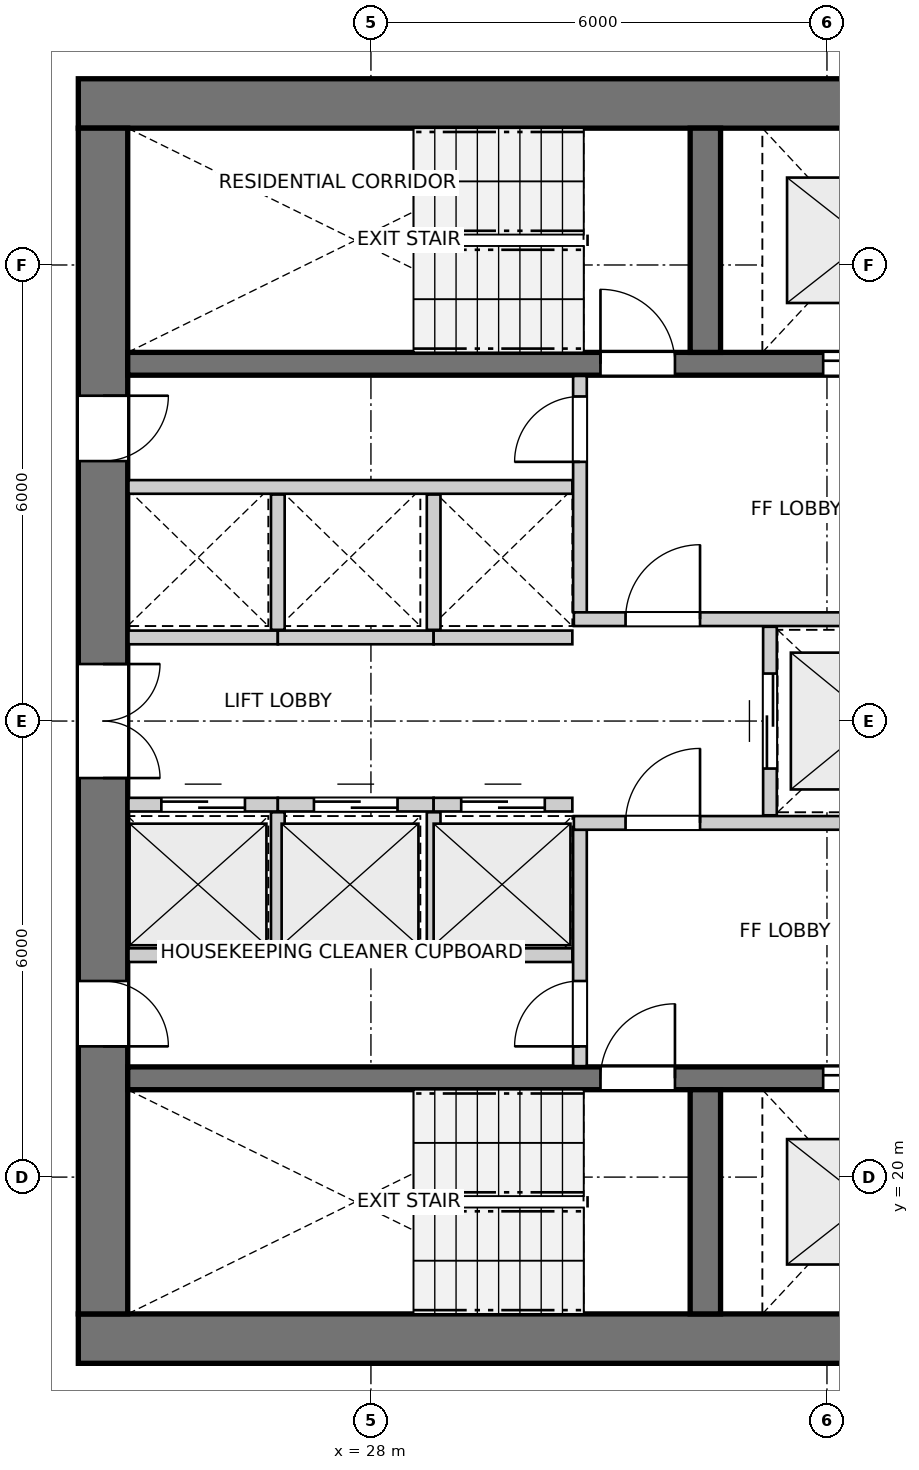
"""IFC4 building model, lengths in metres.
Left out: names, types, materials, properties, quantities, classifications, styles, units other than length and angle.
Written with IfcOpenShell. Run it as: python <this file> out.ifc"""

import sys

from ifc_helpers import new_model, si_unit, direction, frame, frame_2d, origin, place, context, subcontext, project, spatial, rectangle, extrude, source, transform, mapped, element, fill, save


model = new_model("IFC4")
c1 = context("Model", 3, precision=1e-05, world=origin(), true_north=direction((0.0, 1.0)))
c2 = subcontext(c1, "Body", "Model", "MODEL_VIEW")
j1 = project(units=[si_unit("LENGTHUNIT", "METRE"), si_unit("PLANEANGLEUNIT", "RADIAN")], contexts=[c1])
p1 = place(None, origin())
s1 = spatial("IfcSite", under=j1, at=p1, CompositionType="ELEMENT")
p2 = place(p1, origin())
s2 = spatial("IfcBuilding", under=s1, at=p2, CompositionType="ELEMENT")
p3 = place(p2, frame((0.0, 0.0, 102.4)))
s3 = spatial("IfcBuildingStorey", under=s2, at=p3, CompositionType="ELEMENT", Elevation=102.4)
for number, where, z_axis, x_axis in (
    (1, (24.15, 17.875, 0.0), (0.0, 0.0, 1.0), (1.0, 0.0, 0.0)),
    (2, (36.55, 34.125, 0.0), (0.0, 0.0, 1.0), (-1.0, 0.0, 0.0)),
):
    element("IfcWall", number, at=place(p3, frame(where, z_axis=z_axis, x_axis=x_axis)), inside=s3, PredefinedType="SHEAR", context=c2, shape_type="SweptSolid", body=[
        extrude(rectangle(XDim=12.4, YDim=0.65, at=frame_2d((6.2, 0.0))), origin(), (0.0, 0.0, 1.0), 2.95),
    ])
p4 = place(p3, frame((24.475, 33.8, 0.0), z_axis=(0.0, 0.0, 1.0), x_axis=(0.0, -1.0, 0.0)))
e3 = element("IfcWall", 3, at=p4, inside=s3, PredefinedType="SHEAR", context=c2, shape_type="SweptSolid", body=[
    extrude(rectangle(XDim=15.6, YDim=0.65, at=frame_2d((7.8, 0.0))), origin(), (0.0, 0.0, 1.0), 2.95),
])
p5 = place(p4, frame((7.05, 0.0, 0.0)))
e4 = element("IfcOpeningElement", 4, at=p5, cuts=e3, PredefinedType="OPENING", context=c2, shape_type="SweptSolid", body=[
    extrude(rectangle(XDim=1.5, YDim=2.15, at=frame_2d((0.75, 1.075))), frame((0.0, 0.335, 0.0), z_axis=(0.0, -1.0, 0.0), x_axis=(1.0, 0.0, 0.0)), (0.0, 0.0, 1.0), 0.67),
])
p6 = place(p4, frame((3.52, 0.0, 0.0)))
e5 = element("IfcOpeningElement", 5, at=p6, cuts=e3, PredefinedType="OPENING", context=c2, shape_type="SweptSolid", body=[
    extrude(rectangle(XDim=0.86, YDim=2.05, at=frame_2d((0.43, 1.025))), frame((0.0, 0.335, 0.0), z_axis=(0.0, -1.0, 0.0), x_axis=(1.0, 0.0, 0.0)), (0.0, 0.0, 1.0), 0.67),
])
p7 = place(p4, frame((11.22, 0.0, 0.0)))
e6 = element("IfcOpeningElement", 6, at=p7, cuts=e3, PredefinedType="OPENING", context=c2, shape_type="SweptSolid", body=[
    extrude(rectangle(XDim=0.86, YDim=2.05, at=frame_2d((0.43, 1.025))), frame((0.0, 0.335, 0.0), z_axis=(0.0, -1.0, 0.0), x_axis=(1.0, 0.0, 0.0)), (0.0, 0.0, 1.0), 0.67),
])
p8 = place(p3, frame((24.8, 21.3, 0.0), z_axis=(0.0, 0.0, 1.0), x_axis=(1.0, 0.0, 0.0)))
e7 = element("IfcWall", 7, at=p8, inside=s3, PredefinedType="SHEAR", context=c2, shape_type="SweptSolid", body=[
    extrude(rectangle(XDim=11.1, YDim=0.3, at=frame_2d((5.55, 0.0))), origin(), (0.0, 0.0, 1.0), 2.95),
])
p9 = place(p8, frame((6.22, 0.0, 0.0)))
e8 = element("IfcOpeningElement", 8, at=p9, cuts=e7, PredefinedType="OPENING", context=c2, shape_type="SweptSolid", body=[
    extrude(rectangle(XDim=0.98, YDim=2.15, at=frame_2d((0.49, 1.075))), frame((0.0, 0.16, 0.0), z_axis=(0.0, -1.0, 0.0), x_axis=(1.0, 0.0, 0.0)), (0.0, 0.0, 1.0), 0.32),
])
p10 = place(p8, frame((9.15, 0.0, 0.0)))
e9 = element("IfcOpeningElement", 9, at=p10, cuts=e7, PredefinedType="OPENING", context=c2, shape_type="SweptSolid", body=[
    extrude(rectangle(XDim=1.15, YDim=2.15, at=frame_2d((0.575, 1.075))), frame((0.0, 0.16, 0.0), z_axis=(0.0, -1.0, 0.0), x_axis=(1.0, 0.0, 0.0)), (0.0, 0.0, 1.0), 0.32),
])
p11 = place(p3, frame((32.4, 18.2, 0.0), z_axis=(0.0, 0.0, 1.0), x_axis=(0.0, 1.0, 0.0)))
e10 = element("IfcWall", 10, at=p11, inside=s3, PredefinedType="SHEAR", context=c2, shape_type="SweptSolid", body=[
    extrude(rectangle(XDim=2.95, YDim=0.4, at=frame_2d((1.475, 0.0))), origin(), (0.0, 0.0, 1.0), 2.95),
])
p12 = place(p3, frame((24.8, 30.7, 0.0), z_axis=(0.0, 0.0, 1.0), x_axis=(1.0, 0.0, 0.0)))
e11 = element("IfcWall", 11, at=p12, inside=s3, PredefinedType="SHEAR", context=c2, shape_type="SweptSolid", body=[
    extrude(rectangle(XDim=11.1, YDim=0.3, at=frame_2d((5.55, 0.0))), origin(), (0.0, 0.0, 1.0), 2.95),
])
p13 = place(p12, frame((6.22, 0.0, 0.0)))
e12 = element("IfcOpeningElement", 12, at=p13, cuts=e11, PredefinedType="OPENING", context=c2, shape_type="SweptSolid", body=[
    extrude(rectangle(XDim=0.98, YDim=2.15, at=frame_2d((0.49, 1.075))), frame((0.0, 0.16, 0.0), z_axis=(0.0, -1.0, 0.0), x_axis=(1.0, 0.0, 0.0)), (0.0, 0.0, 1.0), 0.32),
])
p14 = place(p12, frame((9.15, 0.0, 0.0)))
e13 = element("IfcOpeningElement", 13, at=p14, cuts=e11, PredefinedType="OPENING", context=c2, shape_type="SweptSolid", body=[
    extrude(rectangle(XDim=1.15, YDim=2.15, at=frame_2d((0.575, 1.075))), frame((0.0, 0.16, 0.0), z_axis=(0.0, -1.0, 0.0), x_axis=(1.0, 0.0, 0.0)), (0.0, 0.0, 1.0), 0.32),
])
p15 = place(p3, frame((32.4, 30.85, 0.0), z_axis=(0.0, 0.0, 1.0), x_axis=(0.0, 1.0, 0.0)))
e14 = element("IfcWall", 14, at=p15, inside=s3, PredefinedType="SHEAR", context=c2, shape_type="SweptSolid", body=[
    extrude(rectangle(XDim=2.95, YDim=0.4, at=frame_2d((1.475, 0.0))), origin(), (0.0, 0.0, 1.0), 2.95),
])
p16 = place(p3, frame((30.75, 21.46, 0.0), z_axis=(0.0, 0.0, 1.0), x_axis=(0.0, 1.0, 0.0)))
e15 = element("IfcWall", 15, at=p16, inside=s3, PredefinedType="PARTITIONING", context=c2, shape_type="SweptSolid", body=[
    extrude(rectangle(XDim=3.11, YDim=0.18, at=frame_2d((1.555, 0.0))), origin(), (0.0, 0.0, 1.0), 2.95),
])
p17 = place(p16, frame((0.26, 0.0, 0.0)))
e16 = element("IfcOpeningElement", 16, at=p17, cuts=e15, PredefinedType="OPENING", context=c2, shape_type="SweptSolid", body=[
    extrude(rectangle(XDim=0.86, YDim=2.05, at=frame_2d((0.43, 1.025))), frame((0.0, 0.1, 0.0), z_axis=(0.0, -1.0, 0.0), x_axis=(1.0, 0.0, 0.0)), (0.0, 0.0, 1.0), 0.2),
])
p18 = place(p3, frame((30.67, 24.66, 0.0), z_axis=(0.0, 0.0, 1.0), x_axis=(1.0, 0.0, 0.0)))
e17 = element("IfcWall", 17, at=p18, inside=s3, PredefinedType="PARTITIONING", context=c2, shape_type="SweptSolid", body=[
    extrude(rectangle(XDim=5.22, YDim=0.18, at=frame_2d((2.61, 0.0))), origin(), (0.0, 0.0, 1.0), 2.95),
])
p19 = place(p18, frame((0.68, 0.0, 0.0)))
e18 = element("IfcOpeningElement", 18, at=p19, cuts=e17, PredefinedType="OPENING", context=c2, shape_type="SweptSolid", body=[
    extrude(rectangle(XDim=0.98, YDim=2.15, at=frame_2d((0.49, 1.075))), frame((0.0, 0.1, 0.0), z_axis=(0.0, -1.0, 0.0), x_axis=(1.0, 0.0, 0.0)), (0.0, 0.0, 1.0), 0.2),
])
p20 = place(p3, frame((30.75, 27.43, 0.0), z_axis=(0.0, 0.0, 1.0), x_axis=(0.0, 1.0, 0.0)))
e19 = element("IfcWall", 19, at=p20, inside=s3, PredefinedType="PARTITIONING", context=c2, shape_type="SweptSolid", body=[
    extrude(rectangle(XDim=3.11, YDim=0.18, at=frame_2d((1.555, 0.0))), origin(), (0.0, 0.0, 1.0), 2.95),
])
p21 = place(p20, frame((1.98, 0.0, 0.0)))
e20 = element("IfcOpeningElement", 20, at=p21, cuts=e19, PredefinedType="OPENING", context=c2, shape_type="SweptSolid", body=[
    extrude(rectangle(XDim=0.86, YDim=2.05, at=frame_2d((0.43, 1.025))), frame((0.0, 0.1, 0.0), z_axis=(0.0, -1.0, 0.0), x_axis=(1.0, 0.0, 0.0)), (0.0, 0.0, 1.0), 0.2),
])
p22 = place(p3, frame((30.67, 27.34, 0.0), z_axis=(0.0, 0.0, 1.0), x_axis=(1.0, 0.0, 0.0)))
e21 = element("IfcWall", 21, at=p22, inside=s3, PredefinedType="PARTITIONING", context=c2, shape_type="SweptSolid", body=[
    extrude(rectangle(XDim=5.22, YDim=0.18, at=frame_2d((2.61, 0.0))), origin(), (0.0, 0.0, 1.0), 2.95),
])
p23 = place(p22, frame((0.68, 0.0, 0.0)))
e22 = element("IfcOpeningElement", 22, at=p23, cuts=e21, PredefinedType="OPENING", context=c2, shape_type="SweptSolid", body=[
    extrude(rectangle(XDim=0.98, YDim=2.15, at=frame_2d((0.49, 1.075))), frame((0.0, 0.1, 0.0), z_axis=(0.0, -1.0, 0.0), x_axis=(1.0, 0.0, 0.0)), (0.0, 0.0, 1.0), 0.2),
])
p24 = place(p3, frame((33.25, 24.76, 0.0), z_axis=(0.0, 0.0, 1.0), x_axis=(0.0, 1.0, 0.0)))
e23 = element("IfcWall", 23, at=p24, inside=s3, PredefinedType="PARTITIONING", context=c2, shape_type="SweptSolid", body=[
    extrude(rectangle(XDim=2.48, YDim=0.18, at=frame_2d((1.24, 0.0))), origin(), (0.0, 0.0, 1.0), 2.95),
])
p25 = place(p24, frame((0.615, 0.0, 0.0)))
e24 = element("IfcOpeningElement", 24, at=p25, cuts=e23, PredefinedType="OPENING", context=c2, shape_type="SweptSolid", body=[
    extrude(rectangle(XDim=1.25, YDim=2.15, at=frame_2d((0.625, 1.075))), frame((0.0, 0.1, 0.0), z_axis=(0.0, -1.0, 0.0), x_axis=(1.0, 0.0, 0.0)), (0.0, 0.0, 1.0), 0.2),
])
p26 = place(p3, frame((24.81, 22.92, 0.0), z_axis=(0.0, 0.0, 1.0), x_axis=(1.0, 0.0, 0.0)))
e25 = element("IfcWall", 25, at=p26, inside=s3, PredefinedType="PARTITIONING", context=c2, shape_type="SweptSolid", body=[
    extrude(rectangle(XDim=5.84, YDim=0.18, at=frame_2d((2.92, 0.0))), origin(), (0.0, 0.0, 1.0), 2.95),
])
p27 = place(p3, frame((24.81, 24.9, 0.0), z_axis=(0.0, 0.0, 1.0), x_axis=(1.0, 0.0, 0.0)))
e26 = element("IfcWall", 26, at=p27, inside=s3, PredefinedType="PARTITIONING", context=c2, shape_type="SweptSolid", body=[
    extrude(rectangle(XDim=1.965, YDim=0.18, at=frame_2d((0.982, 0.0))), origin(), (0.0, 0.0, 1.0), 2.95),
])
p28 = place(p27, frame((0.433, 0.0, 0.0)))
e27 = element("IfcOpeningElement", 27, at=p28, cuts=e26, PredefinedType="OPENING", context=c2, shape_type="SweptSolid", body=[
    extrude(rectangle(XDim=1.1, YDim=2.15, at=frame_2d((0.55, 1.075))), frame((0.0, 0.1, 0.0), z_axis=(0.0, -1.0, 0.0), x_axis=(1.0, 0.0, 0.0)), (0.0, 0.0, 1.0), 0.2),
])
p29 = place(p3, frame((26.775, 24.9, 0.0), z_axis=(0.0, 0.0, 1.0), x_axis=(1.0, 0.0, 0.0)))
e28 = element("IfcWall", 28, at=p29, inside=s3, PredefinedType="PARTITIONING", context=c2, shape_type="SweptSolid", body=[
    extrude(rectangle(XDim=2.05, YDim=0.18, at=frame_2d((1.025, 0.0))), origin(), (0.0, 0.0, 1.0), 2.95),
])
p30 = place(p29, frame((0.475, 0.0, 0.0)))
e29 = element("IfcOpeningElement", 29, at=p30, cuts=e28, PredefinedType="OPENING", context=c2, shape_type="SweptSolid", body=[
    extrude(rectangle(XDim=1.1, YDim=2.15, at=frame_2d((0.55, 1.075))), frame((0.0, 0.1, 0.0), z_axis=(0.0, -1.0, 0.0), x_axis=(1.0, 0.0, 0.0)), (0.0, 0.0, 1.0), 0.2),
])
p31 = place(p3, frame((26.775, 23.02, 0.0), z_axis=(0.0, 0.0, 1.0), x_axis=(0.0, 1.0, 0.0)))
e30 = element("IfcWall", 30, at=p31, inside=s3, PredefinedType="PARTITIONING", context=c2, shape_type="SweptSolid", body=[
    extrude(rectangle(XDim=1.78, YDim=0.18, at=frame_2d((0.89, 0.0))), origin(), (0.0, 0.0, 1.0), 2.95),
])
p32 = place(p3, frame((28.825, 24.9, 0.0), z_axis=(0.0, 0.0, 1.0), x_axis=(1.0, 0.0, 0.0)))
e31 = element("IfcWall", 31, at=p32, inside=s3, PredefinedType="PARTITIONING", context=c2, shape_type="SweptSolid", body=[
    extrude(rectangle(XDim=1.825, YDim=0.18, at=frame_2d((0.913, 0.0))), origin(), (0.0, 0.0, 1.0), 2.95),
])
p33 = place(p32, frame((0.363, 0.0, 0.0)))
e32 = element("IfcOpeningElement", 32, at=p33, cuts=e31, PredefinedType="OPENING", context=c2, shape_type="SweptSolid", body=[
    extrude(rectangle(XDim=1.1, YDim=2.15, at=frame_2d((0.55, 1.075))), frame((0.0, 0.1, 0.0), z_axis=(0.0, -1.0, 0.0), x_axis=(1.0, 0.0, 0.0)), (0.0, 0.0, 1.0), 0.2),
])
p34 = place(p3, frame((28.825, 23.02, 0.0), z_axis=(0.0, 0.0, 1.0), x_axis=(0.0, 1.0, 0.0)))
e33 = element("IfcWall", 33, at=p34, inside=s3, PredefinedType="PARTITIONING", context=c2, shape_type="SweptSolid", body=[
    extrude(rectangle(XDim=1.78, YDim=0.18, at=frame_2d((0.89, 0.0))), origin(), (0.0, 0.0, 1.0), 2.95),
])
p35 = place(p3, frame((24.81, 29.08, 0.0), z_axis=(0.0, 0.0, 1.0), x_axis=(1.0, 0.0, 0.0)))
e34 = element("IfcWall", 34, at=p35, inside=s3, PredefinedType="PARTITIONING", context=c2, shape_type="SweptSolid", body=[
    extrude(rectangle(XDim=5.84, YDim=0.18, at=frame_2d((2.92, 0.0))), origin(), (0.0, 0.0, 1.0), 2.95),
])
p36 = place(p3, frame((24.81, 27.1, 0.0), z_axis=(0.0, 0.0, 1.0), x_axis=(1.0, 0.0, 0.0)))
e35 = element("IfcWall", 35, at=p36, inside=s3, PredefinedType="PARTITIONING", context=c2, shape_type="SweptSolid", body=[
    extrude(rectangle(XDim=1.965, YDim=0.18, at=frame_2d((0.982, 0.0))), origin(), (0.0, 0.0, 1.0), 2.95),
])
p37 = place(p3, frame((26.775, 27.1, 0.0), z_axis=(0.0, 0.0, 1.0), x_axis=(1.0, 0.0, 0.0)))
e36 = element("IfcWall", 36, at=p37, inside=s3, PredefinedType="PARTITIONING", context=c2, shape_type="SweptSolid", body=[
    extrude(rectangle(XDim=2.05, YDim=0.18, at=frame_2d((1.025, 0.0))), origin(), (0.0, 0.0, 1.0), 2.95),
])
p38 = place(p3, frame((26.775, 27.2, 0.0), z_axis=(0.0, 0.0, 1.0), x_axis=(0.0, 1.0, 0.0)))
e37 = element("IfcWall", 37, at=p38, inside=s3, PredefinedType="PARTITIONING", context=c2, shape_type="SweptSolid", body=[
    extrude(rectangle(XDim=1.78, YDim=0.18, at=frame_2d((0.89, 0.0))), origin(), (0.0, 0.0, 1.0), 2.95),
])
p39 = place(p3, frame((28.825, 27.1, 0.0), z_axis=(0.0, 0.0, 1.0), x_axis=(1.0, 0.0, 0.0)))
e38 = element("IfcWall", 38, at=p39, inside=s3, PredefinedType="PARTITIONING", context=c2, shape_type="SweptSolid", body=[
    extrude(rectangle(XDim=1.825, YDim=0.18, at=frame_2d((0.913, 0.0))), origin(), (0.0, 0.0, 1.0), 2.95),
])
p40 = place(p3, frame((28.825, 27.2, 0.0), z_axis=(0.0, 0.0, 1.0), x_axis=(0.0, 1.0, 0.0)))
e39 = element("IfcWall", 39, at=p40, inside=s3, PredefinedType="PARTITIONING", context=c2, shape_type="SweptSolid", body=[
    extrude(rectangle(XDim=1.78, YDim=0.18, at=frame_2d((0.89, 0.0))), origin(), (0.0, 0.0, 1.0), 2.95),
])
m1 = source(origin(), c2, "Body", "SweptSolid", [
    extrude(rectangle(XDim=0.98, YDim=2.15, at=frame_2d((0.49, 1.075))), frame((0.0, 0.025, 0.0), z_axis=(0.0, -1.0, 0.0), x_axis=(1.0, 0.0, 0.0)), (0.0, 0.0, 1.0), 0.05),
])
p41 = place(p9, origin())
e40 = element("IfcDoor", 40, at=p41, inside=s3, OperationType="SINGLE_SWING_RIGHT", PredefinedType="DOOR", context=c2, shape_type="MappedRepresentation", body=[
    mapped(m1, transform((0.0, 0.0, 0.0), x_axis=(1.0, 0.0, 0.0), y_axis=(0.0, 1.0, 0.0), z_axis=(0.0, 0.0, 1.0), scale=1.0)),
])
fill(e8, e40)
m2 = source(origin(), c2, "Body", "SweptSolid", [
    extrude(rectangle(XDim=1.15, YDim=2.15, at=frame_2d((0.575, 1.075))), frame((0.0, 0.025, 0.0), z_axis=(0.0, -1.0, 0.0), x_axis=(1.0, 0.0, 0.0)), (0.0, 0.0, 1.0), 0.05),
])
p42 = place(p10, origin())
e41 = element("IfcDoor", 41, at=p42, inside=s3, OperationType="DOUBLE_DOOR_SLIDING", PredefinedType="DOOR", context=c2, shape_type="MappedRepresentation", body=[
    mapped(m2, transform((0.0, 0.0, 0.0), x_axis=(1.0, 0.0, 0.0), y_axis=(0.0, 1.0, 0.0), z_axis=(0.0, 0.0, 1.0), scale=1.0)),
])
fill(e9, e41)
p43 = place(p13, origin())
e42 = element("IfcDoor", 42, at=p43, inside=s3, OperationType="SINGLE_SWING_LEFT", PredefinedType="DOOR", context=c2, shape_type="MappedRepresentation", body=[
    mapped(m1, transform((0.0, 0.0, 0.0), x_axis=(1.0, 0.0, 0.0), y_axis=(0.0, 1.0, 0.0), z_axis=(0.0, 0.0, 1.0), scale=1.0)),
])
fill(e12, e42)
p44 = place(p14, origin())
e43 = element("IfcDoor", 43, at=p44, inside=s3, OperationType="DOUBLE_DOOR_SLIDING", PredefinedType="DOOR", context=c2, shape_type="MappedRepresentation", body=[
    mapped(m2, transform((0.0, 0.0, 0.0), x_axis=(1.0, 0.0, 0.0), y_axis=(0.0, 1.0, 0.0), z_axis=(0.0, 0.0, 1.0), scale=1.0)),
])
fill(e13, e43)
m3 = source(origin(), c2, "Body", "SweptSolid", [
    extrude(rectangle(XDim=1.5, YDim=2.15, at=frame_2d((0.75, 1.075))), frame((0.0, 0.025, 0.0), z_axis=(0.0, -1.0, 0.0), x_axis=(1.0, 0.0, 0.0)), (0.0, 0.0, 1.0), 0.05),
])
p45 = place(p5, origin())
e44 = element("IfcDoor", 44, at=p45, inside=s3, OperationType="DOUBLE_DOOR_SINGLE_SWING", PredefinedType="DOOR", context=c2, shape_type="MappedRepresentation", body=[
    mapped(m3, transform((0.0, 0.0, 0.0), x_axis=(1.0, 0.0, 0.0), y_axis=(0.0, 1.0, 0.0), z_axis=(0.0, 0.0, 1.0), scale=1.0)),
])
fill(e4, e44)
m4 = source(origin(), c2, "Body", "SweptSolid", [
    extrude(rectangle(XDim=0.86, YDim=2.05, at=frame_2d((0.43, 1.025))), frame((0.0, 0.025, 0.0), z_axis=(0.0, -1.0, 0.0), x_axis=(1.0, 0.0, 0.0)), (0.0, 0.0, 1.0), 0.05),
])
p46 = place(p6, origin())
e45 = element("IfcDoor", 45, at=p46, inside=s3, OperationType="SINGLE_SWING_LEFT", PredefinedType="DOOR", context=c2, shape_type="MappedRepresentation", body=[
    mapped(m4, transform((0.0, 0.0, 0.0), x_axis=(1.0, 0.0, 0.0), y_axis=(0.0, 1.0, 0.0), z_axis=(0.0, 0.0, 1.0), scale=1.0)),
])
fill(e5, e45)
p47 = place(p7, origin())
e46 = element("IfcDoor", 46, at=p47, inside=s3, OperationType="SINGLE_SWING_RIGHT", PredefinedType="DOOR", context=c2, shape_type="MappedRepresentation", body=[
    mapped(m4, transform((0.0, 0.0, 0.0), x_axis=(1.0, 0.0, 0.0), y_axis=(0.0, 1.0, 0.0), z_axis=(0.0, 0.0, 1.0), scale=1.0)),
])
fill(e6, e46)
p48 = place(p17, origin())
e47 = element("IfcDoor", 47, at=p48, inside=s3, OperationType="SINGLE_SWING_LEFT", PredefinedType="DOOR", context=c2, shape_type="MappedRepresentation", body=[
    mapped(m4, transform((0.0, 0.0, 0.0), x_axis=(1.0, 0.0, 0.0), y_axis=(0.0, 1.0, 0.0), z_axis=(0.0, 0.0, 1.0), scale=1.0)),
])
fill(e16, e47)
p49 = place(p19, origin())
e48 = element("IfcDoor", 48, at=p49, inside=s3, OperationType="SINGLE_SWING_RIGHT", PredefinedType="DOOR", context=c2, shape_type="MappedRepresentation", body=[
    mapped(m1, transform((0.0, 0.0, 0.0), x_axis=(1.0, 0.0, 0.0), y_axis=(0.0, 1.0, 0.0), z_axis=(0.0, 0.0, 1.0), scale=1.0)),
])
fill(e18, e48)
p50 = place(p21, origin())
e49 = element("IfcDoor", 49, at=p50, inside=s3, OperationType="SINGLE_SWING_LEFT", PredefinedType="DOOR", context=c2, shape_type="MappedRepresentation", body=[
    mapped(m4, transform((0.0, 0.0, 0.0), x_axis=(1.0, 0.0, 0.0), y_axis=(0.0, 1.0, 0.0), z_axis=(0.0, 0.0, 1.0), scale=1.0)),
])
fill(e20, e49)
p51 = place(p23, origin())
e50 = element("IfcDoor", 50, at=p51, inside=s3, OperationType="SINGLE_SWING_RIGHT", PredefinedType="DOOR", context=c2, shape_type="MappedRepresentation", body=[
    mapped(m1, transform((0.0, 0.0, 0.0), x_axis=(1.0, 0.0, 0.0), y_axis=(0.0, 1.0, 0.0), z_axis=(0.0, 0.0, 1.0), scale=1.0)),
])
fill(e22, e50)
m5 = source(origin(), c2, "Body", "SweptSolid", [
    extrude(rectangle(XDim=1.25, YDim=2.15, at=frame_2d((0.625, 1.075))), frame((0.0, 0.025, 0.0), z_axis=(0.0, -1.0, 0.0), x_axis=(1.0, 0.0, 0.0)), (0.0, 0.0, 1.0), 0.05),
])
p52 = place(p25, origin())
e51 = element("IfcDoor", 51, at=p52, inside=s3, OperationType="DOUBLE_DOOR_SLIDING", PredefinedType="DOOR", context=c2, shape_type="MappedRepresentation", body=[
    mapped(m5, transform((0.0, 0.0, 0.0), x_axis=(1.0, 0.0, 0.0), y_axis=(0.0, 1.0, 0.0), z_axis=(0.0, 0.0, 1.0), scale=1.0)),
])
fill(e24, e51)
m6 = source(origin(), c2, "Body", "SweptSolid", [
    extrude(rectangle(XDim=1.1, YDim=2.15, at=frame_2d((0.55, 1.075))), frame((0.0, 0.025, 0.0), z_axis=(0.0, -1.0, 0.0), x_axis=(1.0, 0.0, 0.0)), (0.0, 0.0, 1.0), 0.05),
])
p53 = place(p28, origin())
e52 = element("IfcDoor", 52, at=p53, inside=s3, OperationType="DOUBLE_DOOR_SLIDING", PredefinedType="DOOR", context=c2, shape_type="MappedRepresentation", body=[
    mapped(m6, transform((0.0, 0.0, 0.0), x_axis=(1.0, 0.0, 0.0), y_axis=(0.0, 1.0, 0.0), z_axis=(0.0, 0.0, 1.0), scale=1.0)),
])
fill(e27, e52)
p54 = place(p30, origin())
e53 = element("IfcDoor", 53, at=p54, inside=s3, OperationType="DOUBLE_DOOR_SLIDING", PredefinedType="DOOR", context=c2, shape_type="MappedRepresentation", body=[
    mapped(m6, transform((0.0, 0.0, 0.0), x_axis=(1.0, 0.0, 0.0), y_axis=(0.0, 1.0, 0.0), z_axis=(0.0, 0.0, 1.0), scale=1.0)),
])
fill(e29, e53)
p55 = place(p33, origin())
e54 = element("IfcDoor", 54, at=p55, inside=s3, OperationType="DOUBLE_DOOR_SLIDING", PredefinedType="DOOR", context=c2, shape_type="MappedRepresentation", body=[
    mapped(m6, transform((0.0, 0.0, 0.0), x_axis=(1.0, 0.0, 0.0), y_axis=(0.0, 1.0, 0.0), z_axis=(0.0, 0.0, 1.0), scale=1.0)),
])
fill(e32, e54)
save(model, sys.argv[1])
